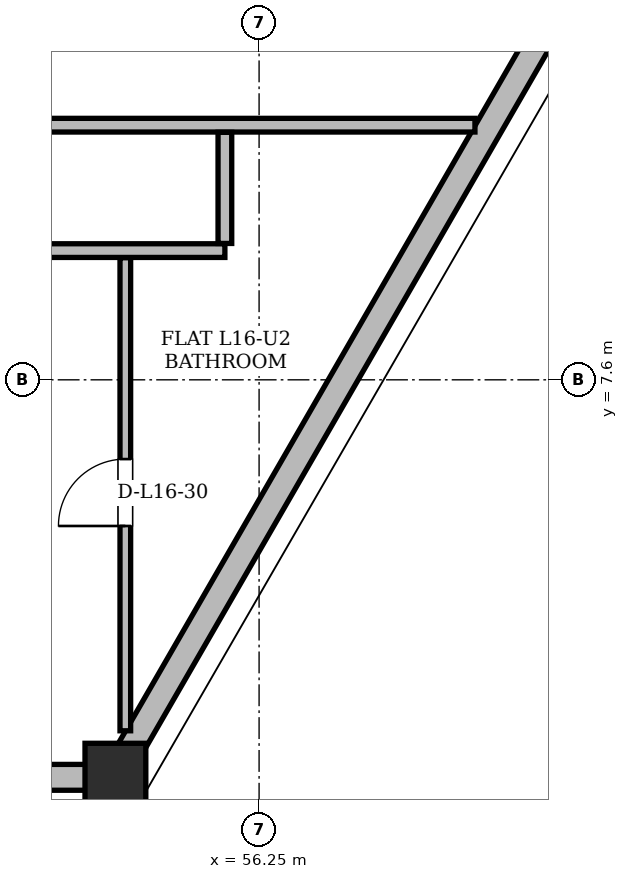
"""IFC4 building model, lengths in metres.
Left out: names, types, materials, properties, quantities, classifications, styles, units other than length and angle.
Written with IfcOpenShell. Run it as: python <this file> out.ifc"""

import sys

from ifc_helpers import new_model, si_unit, direction, frame, frame_2d, origin, origin_2d, place, context, subcontext, project, spatial, rectangle, hollow_rectangle, extrude, element, fill, save


model = new_model("IFC4")
c1 = context("Model", 3, precision=1e-05, world=origin(), true_north=direction((0.0, 1.0)))
c2 = subcontext(c1, "Body", "Model", "MODEL_VIEW")
j1 = project(units=[si_unit("LENGTHUNIT", "METRE"), si_unit("PLANEANGLEUNIT", "RADIAN")], contexts=[c1])
p1 = place(None, origin())
s1 = spatial("IfcSite", under=j1, at=p1, CompositionType="ELEMENT")
p2 = place(p1, origin())
s2 = spatial("IfcBuilding", under=s1, at=p2, CompositionType="ELEMENT")
p3 = place(p2, frame((0.0, 0.0, 63.3)))
s3 = spatial("IfcBuildingStorey", under=s2, at=p3, CompositionType="ELEMENT", Elevation=63.3)
p4 = place(p3, frame((54.337, 2.37, 0.004), z_axis=(0.012368061436, 0.026570945172, 0.999570415693), x_axis=(-0.906597355845, 0.421996723181, 0.0)))
e1 = element("IfcColumn", 1, at=p4, inside=s3, PredefinedType="COLUMN", context=c2, shape_type="SweptSolid", body=[
    extrude(hollow_rectangle(XDim=0.8, YDim=0.8, WallThickness=0.065, at=origin_2d()), origin(), (0.0, 0.0, 1.0), 3.593),
])
p5 = place(p3, frame((20.663, 2.37, 0.0), z_axis=(0.0, 0.0, 1.0), x_axis=(1.0, 0.0, 0.0)))
e2 = element("IfcWall", 2, at=p5, inside=s3, PredefinedType="SOLIDWALL", context=c2, shape_type="SweptSolid", body=[
    extrude(rectangle(XDim=33.675, YDim=0.34, at=frame_2d((16.837, 0.0))), origin(), (0.0, 0.0, 1.0), 2.494),
])
p6 = place(p5, frame((7.824, 0.0, 0.0)))
e3 = element("IfcOpeningElement", 3, at=p6, cuts=e2, PredefinedType="OPENING", context=c2, shape_type="SweptSolid", body=[
    extrude(rectangle(XDim=1.5, YDim=2.2, at=frame_2d((0.75, 1.1))), frame((0.0, 0.17, 0.0), z_axis=(0.0, -1.0, 0.0), x_axis=(1.0, 0.0, 0.0)), (0.0, 0.0, 1.0), 0.34),
])
p7 = place(p5, frame((26.015, 0.0, 0.0)))
e4 = element("IfcOpeningElement", 4, at=p7, cuts=e2, PredefinedType="OPENING", context=c2, shape_type="SweptSolid", body=[
    extrude(rectangle(XDim=1.5, YDim=2.2, at=frame_2d((0.75, 1.1))), frame((0.0, 0.17, 0.0), z_axis=(0.0, -1.0, 0.0), x_axis=(1.0, 0.0, 0.0)), (0.0, 0.0, 1.0), 0.34),
])
p8 = place(p5, frame((11.357, 0.0, 0.85)))
e5 = element("IfcOpeningElement", 5, at=p8, cuts=e2, PredefinedType="OPENING", context=c2, shape_type="SweptSolid", body=[
    extrude(rectangle(XDim=2.0, YDim=1.534, at=frame_2d((1.0, 0.767))), frame((0.0, 0.17, 0.0), z_axis=(0.0, -1.0, 0.0), x_axis=(1.0, 0.0, 0.0)), (0.0, 0.0, 1.0), 0.34),
])
p9 = place(p5, frame((19.079, 0.0, 0.85)))
e6 = element("IfcOpeningElement", 6, at=p9, cuts=e2, PredefinedType="OPENING", context=c2, shape_type="SweptSolid", body=[
    extrude(rectangle(XDim=1.4, YDim=1.534, at=frame_2d((0.7, 0.767))), frame((0.0, 0.17, 0.0), z_axis=(0.0, -1.0, 0.0), x_axis=(1.0, 0.0, 0.0)), (0.0, 0.0, 1.0), 0.34),
])
p10 = place(p5, frame((24.521, 0.0, 0.85)))
e7 = element("IfcOpeningElement", 7, at=p10, cuts=e2, PredefinedType="OPENING", context=c2, shape_type="SweptSolid", body=[
    extrude(rectangle(XDim=1.2, YDim=1.48, at=frame_2d((0.6, 0.74))), frame((0.0, 0.17, 0.0), z_axis=(0.0, -1.0, 0.0), x_axis=(1.0, 0.0, 0.0)), (0.0, 0.0, 1.0), 0.34),
])
p11 = place(p5, frame((29.445, 0.0, 0.85)))
e8 = element("IfcOpeningElement", 8, at=p11, cuts=e2, PredefinedType="OPENING", context=c2, shape_type="SweptSolid", body=[
    extrude(rectangle(XDim=3.0, YDim=1.534, at=frame_2d((1.5, 0.767))), frame((0.0, 0.17, 0.0), z_axis=(0.0, -1.0, 0.0), x_axis=(1.0, 0.0, 0.0)), (0.0, 0.0, 1.0), 0.34),
])
p12 = place(p5, frame((0.98, 0.0, 0.85)))
e9 = element("IfcOpeningElement", 9, at=p12, cuts=e2, PredefinedType="OPENING", context=c2, shape_type="SweptSolid", body=[
    extrude(rectangle(XDim=1.2, YDim=1.48, at=frame_2d((0.6, 0.74))), frame((0.0, 0.17, 0.0), z_axis=(0.0, -1.0, 0.0), x_axis=(1.0, 0.0, 0.0)), (0.0, 0.0, 1.0), 0.34),
])
p13 = place(p5, frame((3.372, 0.0, 0.85)))
e10 = element("IfcOpeningElement", 10, at=p13, cuts=e2, PredefinedType="OPENING", context=c2, shape_type="SweptSolid", body=[
    extrude(rectangle(XDim=1.2, YDim=1.48, at=frame_2d((0.6, 0.74))), frame((0.0, 0.17, 0.0), z_axis=(0.0, -1.0, 0.0), x_axis=(1.0, 0.0, 0.0)), (0.0, 0.0, 1.0), 0.34),
])
p14 = place(p3, frame((54.337, 2.37, 0.0), z_axis=(0.0, 0.0, 1.0), x_axis=(0.500006336147, 0.866021745577, 0.0)))
e11 = element("IfcWall", 11, at=p14, inside=s3, PredefinedType="SOLIDWALL", context=c2, shape_type="SweptSolid", body=[
    extrude(rectangle(XDim=13.871, YDim=0.34, at=frame_2d((6.936, 0.0))), origin(), (0.0, 0.0, 1.0), 2.494),
])
p15 = place(p14, frame((11.849, 0.0, 1.28)))
e12 = element("IfcOpeningElement", 12, at=p15, cuts=e11, PredefinedType="OPENING", context=c2, shape_type="SweptSolid", body=[
    extrude(rectangle(XDim=0.85, YDim=0.92, at=frame_2d((0.425, 0.46))), frame((0.0, 0.17, 0.0), z_axis=(0.0, -1.0, 0.0), x_axis=(1.0, 0.0, 0.0)), (0.0, 0.0, 1.0), 0.34),
])
p16 = place(p3, frame((19.2, 9.3, 0.0), z_axis=(0.0, 0.0, 1.0), x_axis=(1.0, 0.0, 0.0)))
e13 = element("IfcWall", 13, at=p16, inside=s3, PredefinedType="PARTITIONING", context=c2, shape_type="SweptSolid", body=[
    extrude(rectangle(XDim=36.6, YDim=0.18, at=frame_2d((18.3, 0.0))), origin(), (0.0, 0.0, 1.0), 2.738),
])
p17 = place(p16, frame((3.844, 0.0, 0.0)))
e14 = element("IfcOpeningElement", 14, at=p17, cuts=e13, PredefinedType="OPENING", context=c2, shape_type="SweptSolid", body=[
    extrude(rectangle(XDim=1.0, YDim=2.18, at=frame_2d((0.5, 1.09))), frame((0.0, 0.09, 0.0), z_axis=(0.0, -1.0, 0.0), x_axis=(1.0, 0.0, 0.0)), (0.0, 0.0, 1.0), 0.18),
])
p18 = place(p16, frame((17.699, 0.0, 0.0)))
e15 = element("IfcOpeningElement", 15, at=p18, cuts=e13, PredefinedType="OPENING", context=c2, shape_type="SweptSolid", body=[
    extrude(rectangle(XDim=1.0, YDim=2.18, at=frame_2d((0.5, 1.09))), frame((0.0, 0.09, 0.0), z_axis=(0.0, -1.0, 0.0), x_axis=(1.0, 0.0, 0.0)), (0.0, 0.0, 1.0), 0.18),
])
p19 = place(p16, frame((28.995, 0.0, 0.0)))
e16 = element("IfcOpeningElement", 16, at=p19, cuts=e13, PredefinedType="OPENING", context=c2, shape_type="SweptSolid", body=[
    extrude(rectangle(XDim=1.0, YDim=2.18, at=frame_2d((0.5, 1.09))), frame((0.0, 0.09, 0.0), z_axis=(0.0, -1.0, 0.0), x_axis=(1.0, 0.0, 0.0)), (0.0, 0.0, 1.0), 0.18),
])
p20 = place(p3, frame((47.45, 10.95, 0.0), z_axis=(0.0, 0.0, 1.0), x_axis=(1.0, 0.0, 0.0)))
e17 = element("IfcWall", 17, at=p20, inside=s3, PredefinedType="PARTITIONING", context=c2, shape_type="SweptSolid", body=[
    extrude(rectangle(XDim=11.64, YDim=0.18, at=frame_2d((5.82, 0.0))), origin(), (0.0, 0.0, 1.0), 3.36),
])
p21 = place(p3, frame((54.49, 2.983, 0.0), z_axis=(0.0, 0.0, 1.0), x_axis=(0.0, 1.0, 0.0)))
e18 = element("IfcWall", 18, at=p21, inside=s3, PredefinedType="PARTITIONING", context=c2, shape_type="SweptSolid", body=[
    extrude(rectangle(XDim=6.223, YDim=0.14, at=frame_2d((3.112, 0.0))), origin(), (0.0, 0.0, 1.0), 3.36),
])
p22 = place(p21, frame((2.695, 0.0, 0.0)))
e19 = element("IfcOpeningElement", 19, at=p22, cuts=e18, PredefinedType="OPENING", context=c2, shape_type="SweptSolid", body=[
    extrude(rectangle(XDim=0.88, YDim=2.08, at=frame_2d((0.44, 1.04))), frame((0.0, 0.07, 0.0), z_axis=(0.0, -1.0, 0.0), x_axis=(1.0, 0.0, 0.0)), (0.0, 0.0, 1.0), 0.14),
])
p23 = place(p3, frame((55.8, 9.394, 0.0), z_axis=(0.0, 0.0, 1.0), x_axis=(0.0, 1.0, 0.0)))
e20 = element("IfcWall", 20, at=p23, inside=s3, PredefinedType="PARTITIONING", context=c2, shape_type="SweptSolid", body=[
    extrude(rectangle(XDim=1.462, YDim=0.18, at=frame_2d((0.731, 0.0))), origin(), (0.0, 0.0, 1.0), 3.36),
])
p24 = place(p22, origin())
e21 = element("IfcDoor", 21, at=p24, inside=s3, OperationType="SINGLE_SWING_LEFT", PredefinedType="DOOR", context=c2, shape_type="SweptSolid", body=[
    extrude(rectangle(XDim=0.88, YDim=2.08, at=frame_2d((0.44, 1.04))), frame((0.0, 0.025, 0.0), z_axis=(0.0, -1.0, 0.0), x_axis=(1.0, 0.0, 0.0)), (0.0, 0.0, 1.0), 0.05),
])
fill(e19, e21)
save(model, sys.argv[1])
